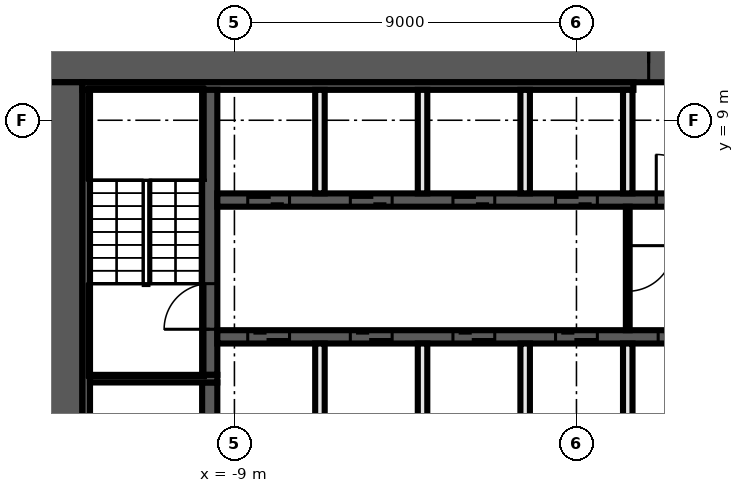
"""IFC4 building model, lengths in metres.
Left out: names, types, materials, properties, quantities, classifications, styles, units other than length and angle.
Written with IfcOpenShell. Run it as: python <this file> out.ifc"""

import sys

from ifc_helpers import new_model, si_unit, direction, frame, frame_2d, origin, place, context, subcontext, project, spatial, rectangle, extrude, element, fill, save


model = new_model("IFC4")
c1 = context("Model", 3, precision=1e-05, world=origin(), true_north=direction((0.0, 1.0)))
c2 = subcontext(c1, "Body", "Model", "MODEL_VIEW")
j1 = project(units=[si_unit("LENGTHUNIT", "METRE"), si_unit("PLANEANGLEUNIT", "RADIAN")], contexts=[c1])
p1 = place(None, origin())
s1 = spatial("IfcSite", under=j1, at=p1, CompositionType="ELEMENT")
p2 = place(p1, origin())
s2 = spatial("IfcBuilding", under=s1, at=p2, CompositionType="ELEMENT")
p3 = place(p2, frame((0.0, 0.0, 145.6)))
s3 = spatial("IfcBuildingStorey", under=s2, at=p3, CompositionType="ELEMENT", Elevation=145.6)
p4 = place(p3, frame((-14.0, 10.5, 0.0), z_axis=(0.0, 0.0, 1.0), x_axis=(1.0, 0.0, 0.0)))
e1 = element("IfcWall", 1, at=p4, inside=s3, PredefinedType="SHEAR", context=c2, shape_type="SweptSolid", body=[
    extrude(rectangle(XDim=28.0, YDim=1.0, at=frame_2d((14.0, 0.0))), origin(), (0.0, 0.0, 1.0), 5.55),
])
p5 = place(p4, frame((15.9, 0.0, 0.0)))
e2 = element("IfcOpeningElement", 2, at=p5, cuts=e1, PredefinedType="OPENING", context=c2, shape_type="SweptSolid", body=[
    extrude(rectangle(XDim=1.6, YDim=2.1, at=frame_2d((0.8, 1.05))), frame((0.0, 0.51, 0.0), z_axis=(0.0, -1.0, 0.0), x_axis=(1.0, 0.0, 0.0)), (0.0, 0.0, 1.0), 1.02),
])
p6 = place(p3, frame((-13.5, -10.0, 0.0), z_axis=(0.0, 0.0, 1.0), x_axis=(0.0, 1.0, 0.0)))
e3 = element("IfcWall", 3, at=p6, inside=s3, PredefinedType="SHEAR", context=c2, shape_type="SweptSolid", body=[
    extrude(rectangle(XDim=20.0, YDim=1.0, at=frame_2d((10.0, 0.0))), origin(), (0.0, 0.0, 1.0), 5.55),
])
p7 = place(p3, frame((-13.0, 9.9, 0.0), z_axis=(0.0, 0.0, 1.0), x_axis=(1.0, 0.0, 0.0)))
e4 = element("IfcWall", 4, at=p7, inside=s3, PredefinedType="SHEAR", context=c2, shape_type="SweptSolid", body=[
    extrude(rectangle(XDim=14.5, YDim=0.2, at=frame_2d((7.25, 0.0))), origin(), (0.0, 0.0, 1.0), 5.55),
])
p8 = place(p3, frame((-12.9, -9.8, 0.0), z_axis=(0.0, 0.0, 1.0), x_axis=(0.0, 1.0, 0.0)))
e5 = element("IfcWall", 5, at=p8, inside=s3, PredefinedType="SHEAR", context=c2, shape_type="SweptSolid", body=[
    extrude(rectangle(XDim=19.6, YDim=0.2, at=frame_2d((9.8, 0.0))), origin(), (0.0, 0.0, 1.0), 5.55),
])
p9 = place(p3, frame((-9.65, -2.1, 0.0), z_axis=(0.0, 0.0, 1.0), x_axis=(0.0, 1.0, 0.0)))
e6 = element("IfcWall", 6, at=p9, inside=s3, PredefinedType="SHEAR", context=c2, shape_type="SweptSolid", body=[
    extrude(rectangle(XDim=4.2, YDim=0.4, at=frame_2d((2.1, 0.0))), origin(), (0.0, 0.0, 1.0), 5.55),
])
p10 = place(p3, frame((-9.65, 2.3, 0.0), z_axis=(0.0, 0.0, 1.0), x_axis=(0.0, 1.0, 0.0)))
e7 = element("IfcWall", 7, at=p10, inside=s3, PredefinedType="SHEAR", context=c2, shape_type="SweptSolid", body=[
    extrude(rectangle(XDim=7.5, YDim=0.4, at=frame_2d((3.75, 0.0))), origin(), (0.0, 0.0, 1.0), 5.55),
])
p11 = place(p10, frame((1.2, 0.0, 0.0)))
e8 = element("IfcOpeningElement", 8, at=p11, cuts=e7, PredefinedType="OPENING", context=c2, shape_type="SweptSolid", body=[
    extrude(rectangle(XDim=1.2, YDim=2.1, at=frame_2d((0.6, 1.05))), frame((0.0, 0.21, 0.0), z_axis=(0.0, -1.0, 0.0), x_axis=(1.0, 0.0, 0.0)), (0.0, 0.0, 1.0), 0.42),
])
p12 = place(p3, frame((-9.45, 2.2, 0.0), z_axis=(0.0, 0.0, 1.0), x_axis=(-1.0, 0.0, 0.0)))
e9 = element("IfcWall", 9, at=p12, inside=s3, PredefinedType="SHEAR", context=c2, shape_type="SweptSolid", body=[
    extrude(rectangle(XDim=3.35, YDim=0.2, at=frame_2d((1.675, 0.0))), origin(), (0.0, 0.0, 1.0), 5.55),
])
p13 = place(p3, frame((-9.45, 6.9, 0.0), z_axis=(0.0, 0.0, 1.0), x_axis=(1.0, 0.0, 0.0)))
e10 = element("IfcWall", 10, at=p13, inside=s3, PredefinedType="SHEAR", context=c2, shape_type="SweptSolid", body=[
    extrude(rectangle(XDim=18.9, YDim=0.35, at=frame_2d((9.45, 0.0))), origin(), (0.0, 0.0, 1.0), 5.55),
])
p14 = place(p13, frame((0.8, 0.0, 0.0)))
e11 = element("IfcOpeningElement", 11, at=p14, cuts=e10, PredefinedType="OPENING", context=c2, shape_type="SweptSolid", body=[
    extrude(rectangle(XDim=1.1, YDim=2.1, at=frame_2d((0.55, 1.05))), frame((0.0, 0.185, 0.0), z_axis=(0.0, -1.0, 0.0), x_axis=(1.0, 0.0, 0.0)), (0.0, 0.0, 1.0), 0.37),
])
p15 = place(p13, frame((3.5, 0.0, 0.0)))
e12 = element("IfcOpeningElement", 12, at=p15, cuts=e10, PredefinedType="OPENING", context=c2, shape_type="SweptSolid", body=[
    extrude(rectangle(XDim=1.1, YDim=2.1, at=frame_2d((0.55, 1.05))), frame((0.0, 0.185, 0.0), z_axis=(0.0, -1.0, 0.0), x_axis=(1.0, 0.0, 0.0)), (0.0, 0.0, 1.0), 0.37),
])
p16 = place(p13, frame((6.2, 0.0, 0.0)))
e13 = element("IfcOpeningElement", 13, at=p16, cuts=e10, PredefinedType="OPENING", context=c2, shape_type="SweptSolid", body=[
    extrude(rectangle(XDim=1.1, YDim=2.1, at=frame_2d((0.55, 1.05))), frame((0.0, 0.185, 0.0), z_axis=(0.0, -1.0, 0.0), x_axis=(1.0, 0.0, 0.0)), (0.0, 0.0, 1.0), 0.37),
])
p17 = place(p13, frame((8.9, 0.0, 0.0)))
e14 = element("IfcOpeningElement", 14, at=p17, cuts=e10, PredefinedType="OPENING", context=c2, shape_type="SweptSolid", body=[
    extrude(rectangle(XDim=1.1, YDim=2.1, at=frame_2d((0.55, 1.05))), frame((0.0, 0.185, 0.0), z_axis=(0.0, -1.0, 0.0), x_axis=(1.0, 0.0, 0.0)), (0.0, 0.0, 1.0), 0.37),
])
p18 = place(p13, frame((11.55, 0.0, 0.0)))
e15 = element("IfcOpeningElement", 15, at=p18, cuts=e10, PredefinedType="OPENING", context=c2, shape_type="SweptSolid", body=[
    extrude(rectangle(XDim=1.2, YDim=2.1, at=frame_2d((0.6, 1.05))), frame((0.0, 0.185, 0.0), z_axis=(0.0, -1.0, 0.0), x_axis=(1.0, 0.0, 0.0)), (0.0, 0.0, 1.0), 0.37),
])
p19 = place(p13, frame((14.3, 0.0, 0.0)))
e16 = element("IfcOpeningElement", 16, at=p19, cuts=e10, PredefinedType="OPENING", context=c2, shape_type="SweptSolid", body=[
    extrude(rectangle(XDim=1.1, YDim=2.1, at=frame_2d((0.55, 1.05))), frame((0.0, 0.185, 0.0), z_axis=(0.0, -1.0, 0.0), x_axis=(1.0, 0.0, 0.0)), (0.0, 0.0, 1.0), 0.37),
])
p20 = place(p13, frame((17.0, 0.0, 0.0)))
e17 = element("IfcOpeningElement", 17, at=p20, cuts=e10, PredefinedType="OPENING", context=c2, shape_type="SweptSolid", body=[
    extrude(rectangle(XDim=1.1, YDim=2.1, at=frame_2d((0.55, 1.05))), frame((0.0, 0.185, 0.0), z_axis=(0.0, -1.0, 0.0), x_axis=(1.0, 0.0, 0.0)), (0.0, 0.0, 1.0), 0.37),
])
p21 = place(p3, frame((9.45, 3.3, 0.0), z_axis=(0.0, 0.0, 1.0), x_axis=(-1.0, 0.0, 0.0)))
e18 = element("IfcWall", 18, at=p21, inside=s3, PredefinedType="SHEAR", context=c2, shape_type="SweptSolid", body=[
    extrude(rectangle(XDim=18.9, YDim=0.35, at=frame_2d((9.45, 0.0))), origin(), (0.0, 0.0, 1.0), 5.55),
])
p22 = place(p21, frame((17.0, 0.0, 0.0)))
e19 = element("IfcOpeningElement", 19, at=p22, cuts=e18, PredefinedType="OPENING", context=c2, shape_type="SweptSolid", body=[
    extrude(rectangle(XDim=1.1, YDim=2.1, at=frame_2d((0.55, 1.05))), frame((0.0, 0.185, 0.0), z_axis=(0.0, -1.0, 0.0), x_axis=(1.0, 0.0, 0.0)), (0.0, 0.0, 1.0), 0.37),
])
p23 = place(p21, frame((14.3, 0.0, 0.0)))
e20 = element("IfcOpeningElement", 20, at=p23, cuts=e18, PredefinedType="OPENING", context=c2, shape_type="SweptSolid", body=[
    extrude(rectangle(XDim=1.1, YDim=2.1, at=frame_2d((0.55, 1.05))), frame((0.0, 0.185, 0.0), z_axis=(0.0, -1.0, 0.0), x_axis=(1.0, 0.0, 0.0)), (0.0, 0.0, 1.0), 0.37),
])
p24 = place(p21, frame((11.6, 0.0, 0.0)))
e21 = element("IfcOpeningElement", 21, at=p24, cuts=e18, PredefinedType="OPENING", context=c2, shape_type="SweptSolid", body=[
    extrude(rectangle(XDim=1.1, YDim=2.1, at=frame_2d((0.55, 1.05))), frame((0.0, 0.185, 0.0), z_axis=(0.0, -1.0, 0.0), x_axis=(1.0, 0.0, 0.0)), (0.0, 0.0, 1.0), 0.37),
])
p25 = place(p21, frame((8.9, 0.0, 0.0)))
e22 = element("IfcOpeningElement", 22, at=p25, cuts=e18, PredefinedType="OPENING", context=c2, shape_type="SweptSolid", body=[
    extrude(rectangle(XDim=1.1, YDim=2.1, at=frame_2d((0.55, 1.05))), frame((0.0, 0.185, 0.0), z_axis=(0.0, -1.0, 0.0), x_axis=(1.0, 0.0, 0.0)), (0.0, 0.0, 1.0), 0.37),
])
p26 = place(p21, frame((6.2, 0.0, 0.0)))
e23 = element("IfcOpeningElement", 23, at=p26, cuts=e18, PredefinedType="OPENING", context=c2, shape_type="SweptSolid", body=[
    extrude(rectangle(XDim=1.1, YDim=2.1, at=frame_2d((0.55, 1.05))), frame((0.0, 0.185, 0.0), z_axis=(0.0, -1.0, 0.0), x_axis=(1.0, 0.0, 0.0)), (0.0, 0.0, 1.0), 0.37),
])
p27 = place(p21, frame((3.5, 0.0, 0.0)))
e24 = element("IfcOpeningElement", 24, at=p27, cuts=e18, PredefinedType="OPENING", context=c2, shape_type="SweptSolid", body=[
    extrude(rectangle(XDim=1.1, YDim=2.1, at=frame_2d((0.55, 1.05))), frame((0.0, 0.185, 0.0), z_axis=(0.0, -1.0, 0.0), x_axis=(1.0, 0.0, 0.0)), (0.0, 0.0, 1.0), 0.37),
])
p28 = place(p21, frame((0.9, 0.0, 0.0)))
e25 = element("IfcOpeningElement", 25, at=p28, cuts=e18, PredefinedType="OPENING", context=c2, shape_type="SweptSolid", body=[
    extrude(rectangle(XDim=0.9, YDim=2.1, at=frame_2d((0.45, 1.05))), frame((0.0, 0.185, 0.0), z_axis=(0.0, -1.0, 0.0), x_axis=(1.0, 0.0, 0.0)), (0.0, 0.0, 1.0), 0.37),
])
p29 = place(p3, frame((1.35, 6.725, 0.0), z_axis=(0.0, 0.0, 1.0), x_axis=(0.0, -1.0, 0.0)))
e26 = element("IfcWall", 26, at=p29, inside=s3, PredefinedType="PARTITIONING", context=c2, shape_type="SweptSolid", body=[
    extrude(rectangle(XDim=3.25, YDim=0.1, at=frame_2d((1.625, 0.0))), origin(), (0.0, 0.0, 1.0), 5.55),
])
p30 = place(p29, frame((1.025, 0.0, 0.0)))
e27 = element("IfcOpeningElement", 27, at=p30, cuts=e26, PredefinedType="OPENING", context=c2, shape_type="SweptSolid", body=[
    extrude(rectangle(XDim=1.2, YDim=2.1, at=frame_2d((0.6, 1.05))), frame((0.0, 0.06, 0.0), z_axis=(0.0, -1.0, 0.0), x_axis=(1.0, 0.0, 0.0)), (0.0, 0.0, 1.0), 0.12),
])
for number, where, z_axis, x_axis in (
    (28, (1.35, 0.4, 0.0), (0.0, 0.0, 1.0), (0.0, 1.0, 0.0)),
    (29, (1.35, 7.075, 0.0), (0.0, 0.0, 1.0), (0.0, 1.0, 0.0)),
    (30, (-1.35, 0.4, 0.0), (0.0, 0.0, 1.0), (0.0, 1.0, 0.0)),
    (31, (-1.35, 7.075, 0.0), (0.0, 0.0, 1.0), (0.0, 1.0, 0.0)),
    (32, (-4.05, 0.4, 0.0), (0.0, 0.0, 1.0), (0.0, 1.0, 0.0)),
    (33, (-4.05, 7.075, 0.0), (0.0, 0.0, 1.0), (0.0, 1.0, 0.0)),
    (34, (-6.75, 0.4, 0.0), (0.0, 0.0, 1.0), (0.0, 1.0, 0.0)),
    (35, (-6.75, 7.075, 0.0), (0.0, 0.0, 1.0), (0.0, 1.0, 0.0)),
):
    element("IfcWall", number, at=place(p3, frame(where, z_axis=z_axis, x_axis=x_axis)), inside=s3, PredefinedType="SOLIDWALL", context=c2, shape_type="SweptSolid", body=[
        extrude(rectangle(XDim=2.725, YDim=0.25, at=frame_2d((1.363, 0.0))), origin(), (0.0, 0.0, 1.0), 5.55),
    ])
p31 = place(p14, origin())
e36 = element("IfcDoor", 36, at=p31, inside=s3, OperationType="DOUBLE_DOOR_SLIDING", PredefinedType="DOOR", context=c2, shape_type="SweptSolid", body=[
    extrude(rectangle(XDim=1.1, YDim=2.1, at=frame_2d((0.55, 1.05))), frame((0.0, 0.025, 0.0), z_axis=(0.0, -1.0, 0.0), x_axis=(1.0, 0.0, 0.0)), (0.0, 0.0, 1.0), 0.05),
])
fill(e11, e36)
p32 = place(p15, origin())
e37 = element("IfcDoor", 37, at=p32, inside=s3, OperationType="DOUBLE_DOOR_SLIDING", PredefinedType="DOOR", context=c2, shape_type="SweptSolid", body=[
    extrude(rectangle(XDim=1.1, YDim=2.1, at=frame_2d((0.55, 1.05))), frame((0.0, 0.025, 0.0), z_axis=(0.0, -1.0, 0.0), x_axis=(1.0, 0.0, 0.0)), (0.0, 0.0, 1.0), 0.05),
])
fill(e12, e37)
p33 = place(p16, origin())
e38 = element("IfcDoor", 38, at=p33, inside=s3, OperationType="DOUBLE_DOOR_SLIDING", PredefinedType="DOOR", context=c2, shape_type="SweptSolid", body=[
    extrude(rectangle(XDim=1.1, YDim=2.1, at=frame_2d((0.55, 1.05))), frame((0.0, 0.025, 0.0), z_axis=(0.0, -1.0, 0.0), x_axis=(1.0, 0.0, 0.0)), (0.0, 0.0, 1.0), 0.05),
])
fill(e13, e38)
p34 = place(p17, origin())
e39 = element("IfcDoor", 39, at=p34, inside=s3, OperationType="DOUBLE_DOOR_SLIDING", PredefinedType="DOOR", context=c2, shape_type="SweptSolid", body=[
    extrude(rectangle(XDim=1.1, YDim=2.1, at=frame_2d((0.55, 1.05))), frame((0.0, 0.025, 0.0), z_axis=(0.0, -1.0, 0.0), x_axis=(1.0, 0.0, 0.0)), (0.0, 0.0, 1.0), 0.05),
])
fill(e14, e39)
p35 = place(p5, origin())
e40 = element("IfcDoor", 40, at=p35, inside=s3, OperationType="DOUBLE_DOOR_SINGLE_SWING", PredefinedType="DOOR", context=c2, shape_type="SweptSolid", body=[
    extrude(rectangle(XDim=1.6, YDim=2.1, at=frame_2d((0.8, 1.05))), frame((0.0, 0.025, 0.0), z_axis=(0.0, -1.0, 0.0), x_axis=(1.0, 0.0, 0.0)), (0.0, 0.0, 1.0), 0.05),
])
fill(e2, e40)
p36 = place(p18, origin())
e41 = element("IfcDoor", 41, at=p36, inside=s3, OperationType="SINGLE_SWING_LEFT", PredefinedType="DOOR", context=c2, shape_type="SweptSolid", body=[
    extrude(rectangle(XDim=1.2, YDim=2.1, at=frame_2d((0.6, 1.05))), frame((0.0, 0.025, 0.0), z_axis=(0.0, -1.0, 0.0), x_axis=(1.0, 0.0, 0.0)), (0.0, 0.0, 1.0), 0.05),
])
fill(e15, e41)
p37 = place(p22, origin())
e42 = element("IfcDoor", 42, at=p37, inside=s3, OperationType="DOUBLE_DOOR_SLIDING", PredefinedType="DOOR", context=c2, shape_type="SweptSolid", body=[
    extrude(rectangle(XDim=1.1, YDim=2.1, at=frame_2d((0.55, 1.05))), frame((0.0, 0.025, 0.0), z_axis=(0.0, -1.0, 0.0), x_axis=(1.0, 0.0, 0.0)), (0.0, 0.0, 1.0), 0.05),
])
fill(e19, e42)
p38 = place(p23, origin())
e43 = element("IfcDoor", 43, at=p38, inside=s3, OperationType="DOUBLE_DOOR_SLIDING", PredefinedType="DOOR", context=c2, shape_type="SweptSolid", body=[
    extrude(rectangle(XDim=1.1, YDim=2.1, at=frame_2d((0.55, 1.05))), frame((0.0, 0.025, 0.0), z_axis=(0.0, -1.0, 0.0), x_axis=(1.0, 0.0, 0.0)), (0.0, 0.0, 1.0), 0.05),
])
fill(e20, e43)
p39 = place(p24, origin())
e44 = element("IfcDoor", 44, at=p39, inside=s3, OperationType="DOUBLE_DOOR_SLIDING", PredefinedType="DOOR", context=c2, shape_type="SweptSolid", body=[
    extrude(rectangle(XDim=1.1, YDim=2.1, at=frame_2d((0.55, 1.05))), frame((0.0, 0.025, 0.0), z_axis=(0.0, -1.0, 0.0), x_axis=(1.0, 0.0, 0.0)), (0.0, 0.0, 1.0), 0.05),
])
fill(e21, e44)
p40 = place(p25, origin())
e45 = element("IfcDoor", 45, at=p40, inside=s3, OperationType="DOUBLE_DOOR_SLIDING", PredefinedType="DOOR", context=c2, shape_type="SweptSolid", body=[
    extrude(rectangle(XDim=1.1, YDim=2.1, at=frame_2d((0.55, 1.05))), frame((0.0, 0.025, 0.0), z_axis=(0.0, -1.0, 0.0), x_axis=(1.0, 0.0, 0.0)), (0.0, 0.0, 1.0), 0.05),
])
fill(e22, e45)
p41 = place(p26, origin())
e46 = element("IfcDoor", 46, at=p41, inside=s3, OperationType="DOUBLE_DOOR_SLIDING", PredefinedType="DOOR", context=c2, shape_type="SweptSolid", body=[
    extrude(rectangle(XDim=1.1, YDim=2.1, at=frame_2d((0.55, 1.05))), frame((0.0, 0.025, 0.0), z_axis=(0.0, -1.0, 0.0), x_axis=(1.0, 0.0, 0.0)), (0.0, 0.0, 1.0), 0.05),
])
fill(e23, e46)
p42 = place(p11, origin())
e47 = element("IfcDoor", 47, at=p42, inside=s3, OperationType="SINGLE_SWING_RIGHT", PredefinedType="DOOR", context=c2, shape_type="SweptSolid", body=[
    extrude(rectangle(XDim=1.2, YDim=2.1, at=frame_2d((0.6, 1.05))), frame((0.0, 0.025, 0.0), z_axis=(0.0, -1.0, 0.0), x_axis=(1.0, 0.0, 0.0)), (0.0, 0.0, 1.0), 0.05),
])
fill(e8, e47)
p43 = place(p30, origin())
e48 = element("IfcDoor", 48, at=p43, inside=s3, OperationType="SINGLE_SWING_LEFT", PredefinedType="DOOR", context=c2, shape_type="SweptSolid", body=[
    extrude(rectangle(XDim=1.2, YDim=2.1, at=frame_2d((0.6, 1.05))), frame((0.0, 0.025, 0.0), z_axis=(0.0, -1.0, 0.0), x_axis=(1.0, 0.0, 0.0)), (0.0, 0.0, 1.0), 0.05),
])
fill(e27, e48)
save(model, sys.argv[1])
